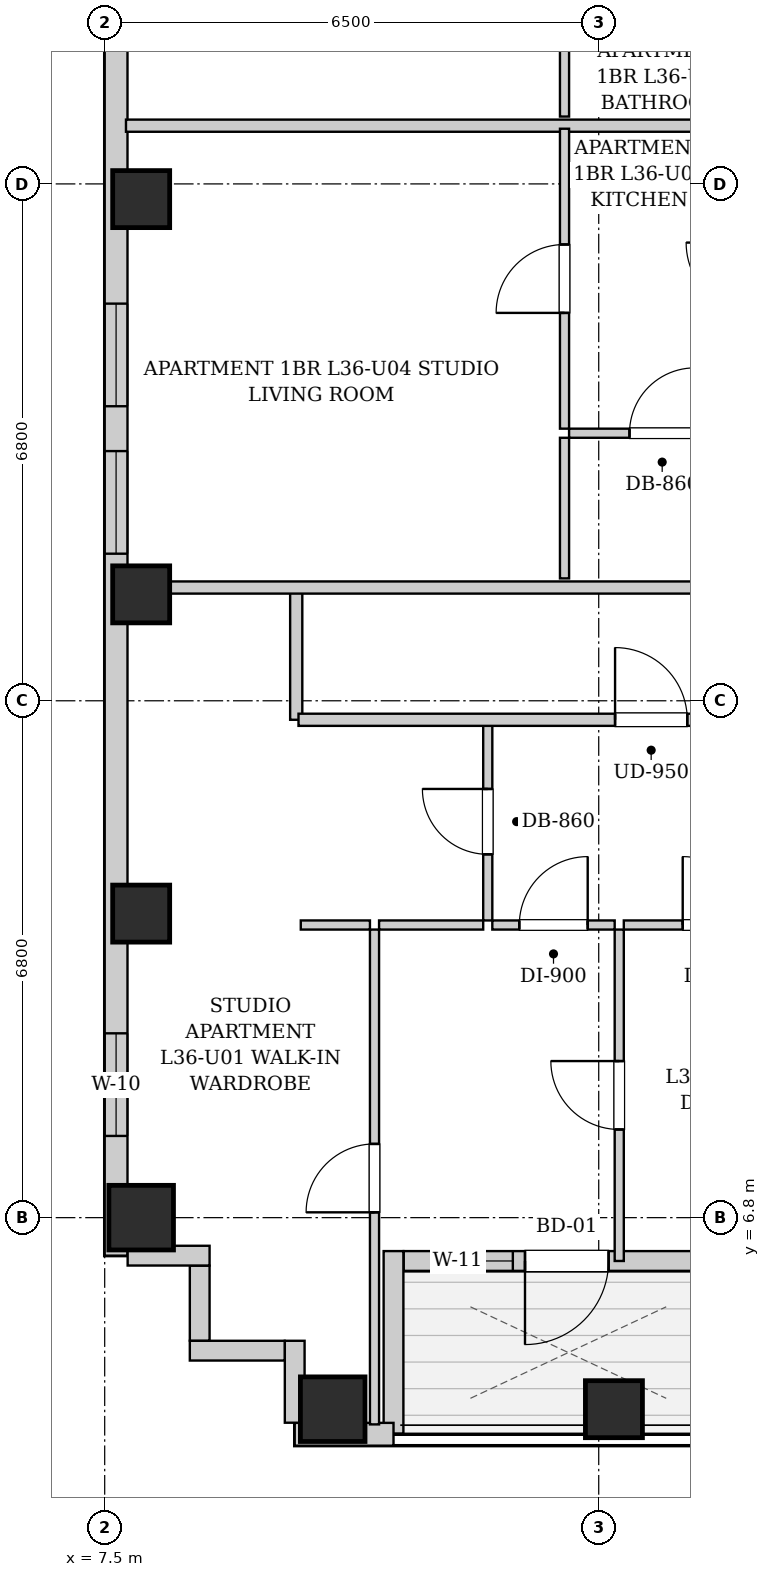
"""IFC4 building model, lengths in metres.
Left out: names, types, materials, properties, quantities, classifications, styles, units other than length and angle.
Written with IfcOpenShell. Run it as: python <this file> out.ifc"""

import sys

from ifc_helpers import new_model, si_unit, direction, frame, frame_2d, origin, origin_2d, place, context, subcontext, project, spatial, rectangle, extrude, element, fill, save


model = new_model("IFC4")
c1 = context("Model", 3, precision=1e-05, world=origin(), true_north=direction((0.0, 1.0)))
c2 = subcontext(c1, "Body", "Model", "MODEL_VIEW")
j1 = project(units=[si_unit("LENGTHUNIT", "METRE"), si_unit("PLANEANGLEUNIT", "RADIAN")], contexts=[c1])
p1 = place(None, origin())
s1 = spatial("IfcSite", under=j1, at=p1, CompositionType="ELEMENT")
p2 = place(p1, origin())
s2 = spatial("IfcBuilding", under=s1, at=p2, CompositionType="ELEMENT")
p3 = place(p2, frame((0.0, 0.0, 127.65)))
s3 = spatial("IfcBuildingStorey", under=s2, at=p3, CompositionType="ELEMENT", Elevation=127.65)
p4 = place(p3, frame((10.5, 4.28, 0.0), z_axis=(0.0, 0.0, 1.0), x_axis=(1.0, 0.0, 0.0)))
e1 = element("IfcColumn", 1, at=p4, inside=s3, PredefinedType="COLUMN", context=c2, shape_type="SweptSolid", body=[
    extrude(rectangle(XDim=0.85, YDim=0.85, at=origin_2d()), origin(), (0.0, 0.0, 1.0), 3.25),
])
p5 = place(p3, frame((14.2, 4.28, 0.0), z_axis=(0.0, 0.0, 1.0), x_axis=(1.0, 0.0, 0.0)))
e2 = element("IfcColumn", 2, at=p5, inside=s3, PredefinedType="COLUMN", context=c2, shape_type="SweptSolid", body=[
    extrude(rectangle(XDim=0.75, YDim=0.75, at=origin_2d()), origin(), (0.0, 0.0, 1.0), 3.25),
])
p6 = place(p3, frame((7.98, 6.8, 0.0), z_axis=(0.0, 0.0, 1.0), x_axis=(1.0, 0.0, 0.0)))
e3 = element("IfcColumn", 3, at=p6, inside=s3, PredefinedType="COLUMN", context=c2, shape_type="SweptSolid", body=[
    extrude(rectangle(XDim=0.85, YDim=0.85, at=origin_2d()), origin(), (0.0, 0.0, 1.0), 3.25),
])
for number, where, z_axis, x_axis in (
    (4, (7.98, 10.8, 0.0), (0.0, 0.0, 1.0), (1.0, 0.0, 0.0)),
    (5, (7.98, 15.0, 0.0), (0.0, 0.0, 1.0), (1.0, 0.0, 0.0)),
    (6, (7.98, 20.2, 0.0), (0.0, 0.0, 1.0), (1.0, 0.0, 0.0)),
):
    element("IfcColumn", number, at=place(p3, frame(where, z_axis=z_axis, x_axis=x_axis)), inside=s3, PredefinedType="COLUMN", context=c2, shape_type="SweptSolid", body=[
        extrude(rectangle(XDim=0.75, YDim=0.75, at=origin_2d()), origin(), (0.0, 0.0, 1.0), 3.25),
    ])
p7 = place(p3, frame((15.766, 6.23, 0.0), z_axis=(0.0, 0.0, 1.0), x_axis=(-1.0, 0.0, 0.0)))
e7 = element("IfcWall", 7, at=p7, inside=s3, PredefinedType="SOLIDWALL", context=c2, shape_type="SweptSolid", body=[
    extrude(rectangle(XDim=4.332, YDim=0.26, at=frame_2d((2.166, 0.0))), origin(), (0.0, 0.0, 1.0), 2.99),
])
p8 = place(p7, frame((1.636, 0.0, 0.0)))
e8 = element("IfcOpeningElement", 8, at=p8, cuts=e7, PredefinedType="OPENING", context=c2, shape_type="SweptSolid", body=[
    extrude(rectangle(XDim=1.1, YDim=2.0, at=frame_2d((0.55, 1.0))), frame((0.0, 0.14, 0.0), z_axis=(0.0, -1.0, 0.0), x_axis=(1.0, 0.0, 0.0)), (0.0, 0.0, 1.0), 0.28),
])
p9 = place(p7, frame((2.896, 0.0, 0.55)))
e9 = element("IfcOpeningElement", 9, at=p9, cuts=e7, PredefinedType="OPENING", context=c2, shape_type="SweptSolid", body=[
    extrude(rectangle(XDim=0.85, YDim=1.2, at=frame_2d((0.425, 0.6))), frame((0.0, 0.14, 0.0), z_axis=(0.0, -1.0, 0.0), x_axis=(1.0, 0.0, 0.0)), (0.0, 0.0, 1.0), 0.28),
])
p10 = place(p3, frame((11.3, 6.36, 0.0), z_axis=(0.0, 0.0, 1.0), x_axis=(0.0, -1.0, 0.0)))
e10 = element("IfcWall", 10, at=p10, inside=s3, PredefinedType="SOLIDWALL", context=c2, shape_type="SweptSolid", body=[
    extrude(rectangle(XDim=2.4, YDim=0.26, at=frame_2d((1.2, 0.0))), origin(), (0.0, 0.0, 1.0), 2.99),
])
p11 = place(p3, frame((11.3, 3.95, 0.0), z_axis=(0.0, 0.0, 1.0), x_axis=(-1.0, 0.0, 0.0)))
e11 = element("IfcWall", 11, at=p11, inside=s3, PredefinedType="SOLIDWALL", context=c2, shape_type="SweptSolid", body=[
    extrude(rectangle(XDim=1.3, YDim=0.3, at=frame_2d((0.65, 0.0))), origin(), (0.0, 0.0, 1.0), 2.99),
])
p12 = place(p3, frame((7.65, 6.3, 0.0), z_axis=(0.0, 0.0, 1.0), x_axis=(0.0, 1.0, 0.0)))
e12 = element("IfcWall", 12, at=p12, inside=s3, PredefinedType="SOLIDWALL", context=c2, shape_type="SweptSolid", body=[
    extrude(rectangle(XDim=34.5, YDim=0.3, at=frame_2d((17.25, 0.0))), origin(), (0.0, 0.0, 1.0), 2.99),
])
p13 = place(p12, frame((1.575, 0.0, 0.55)))
e13 = element("IfcOpeningElement", 13, at=p13, cuts=e12, PredefinedType="OPENING", context=c2, shape_type="SweptSolid", body=[
    extrude(rectangle(XDim=1.35, YDim=1.2, at=frame_2d((0.675, 0.6))), frame((0.0, 0.16, 0.0), z_axis=(0.0, -1.0, 0.0), x_axis=(1.0, 0.0, 0.0)), (0.0, 0.0, 1.0), 0.32),
])
p14 = place(p12, frame((30.075, 0.0, 0.55)))
e14 = element("IfcOpeningElement", 14, at=p14, cuts=e12, PredefinedType="OPENING", context=c2, shape_type="SweptSolid", body=[
    extrude(rectangle(XDim=1.35, YDim=1.2, at=frame_2d((0.675, 0.6))), frame((0.0, 0.16, 0.0), z_axis=(0.0, -1.0, 0.0), x_axis=(1.0, 0.0, 0.0)), (0.0, 0.0, 1.0), 0.32),
])
p15 = place(p12, frame((28.235, 0.0, 0.55)))
e15 = element("IfcOpeningElement", 15, at=p15, cuts=e12, PredefinedType="OPENING", context=c2, shape_type="SweptSolid", body=[
    extrude(rectangle(XDim=1.35, YDim=1.2, at=frame_2d((0.675, 0.6))), frame((0.0, 0.16, 0.0), z_axis=(0.0, -1.0, 0.0), x_axis=(1.0, 0.0, 0.0)), (0.0, 0.0, 1.0), 0.32),
])
p16 = place(p12, frame((11.175, 0.0, 0.55)))
e16 = element("IfcOpeningElement", 16, at=p16, cuts=e12, PredefinedType="OPENING", context=c2, shape_type="SweptSolid", body=[
    extrude(rectangle(XDim=1.35, YDim=1.2, at=frame_2d((0.675, 0.6))), frame((0.0, 0.16, 0.0), z_axis=(0.0, -1.0, 0.0), x_axis=(1.0, 0.0, 0.0)), (0.0, 0.0, 1.0), 0.32),
])
p17 = place(p12, frame((9.235, 0.0, 0.55)))
e17 = element("IfcOpeningElement", 17, at=p17, cuts=e12, PredefinedType="OPENING", context=c2, shape_type="SweptSolid", body=[
    extrude(rectangle(XDim=1.35, YDim=1.2, at=frame_2d((0.675, 0.6))), frame((0.0, 0.16, 0.0), z_axis=(0.0, -1.0, 0.0), x_axis=(1.0, 0.0, 0.0)), (0.0, 0.0, 1.0), 0.32),
])
p18 = place(p12, frame((18.2, 0.0, 0.55)))
e18 = element("IfcOpeningElement", 18, at=p18, cuts=e12, PredefinedType="OPENING", context=c2, shape_type="SweptSolid", body=[
    extrude(rectangle(XDim=1.35, YDim=1.2, at=frame_2d((0.675, 0.6))), frame((0.0, 0.16, 0.0), z_axis=(0.0, -1.0, 0.0), x_axis=(1.0, 0.0, 0.0)), (0.0, 0.0, 1.0), 0.32),
])
p19 = place(p12, frame((19.81, 0.0, 0.55)))
e19 = element("IfcOpeningElement", 19, at=p19, cuts=e12, PredefinedType="OPENING", context=c2, shape_type="SweptSolid", body=[
    extrude(rectangle(XDim=1.35, YDim=1.2, at=frame_2d((0.675, 0.6))), frame((0.0, 0.16, 0.0), z_axis=(0.0, -1.0, 0.0), x_axis=(1.0, 0.0, 0.0)), (0.0, 0.0, 1.0), 0.32),
])
p20 = place(p3, frame((10.0, 4.102, 0.0), z_axis=(0.0, 0.0, 1.0), x_axis=(0.0, 1.0, 0.0)))
e20 = element("IfcWall", 20, at=p20, inside=s3, PredefinedType="SOLIDWALL", context=c2, shape_type="SweptSolid", body=[
    extrude(rectangle(XDim=1.078, YDim=0.26, at=frame_2d((0.539, 0.0))), origin(), (0.0, 0.0, 1.0), 2.99),
])
p21 = place(p3, frame((9.868, 5.05, 0.0), z_axis=(0.0, 0.0, 1.0), x_axis=(-1.0, 0.0, 0.0)))
e21 = element("IfcWall", 21, at=p21, inside=s3, PredefinedType="SOLIDWALL", context=c2, shape_type="SweptSolid", body=[
    extrude(rectangle(XDim=1.248, YDim=0.26, at=frame_2d((0.624, 0.0))), origin(), (0.0, 0.0, 1.0), 2.99),
])
p22 = place(p3, frame((8.75, 5.182, 0.0), z_axis=(0.0, 0.0, 1.0), x_axis=(0.0, 1.0, 0.0)))
e22 = element("IfcWall", 22, at=p22, inside=s3, PredefinedType="SOLIDWALL", context=c2, shape_type="SweptSolid", body=[
    extrude(rectangle(XDim=0.986, YDim=0.26, at=frame_2d((0.493, 0.0))), origin(), (0.0, 0.0, 1.0), 2.99),
])
p23 = place(p3, frame((8.88, 6.3, 0.0), z_axis=(0.0, 0.0, 1.0), x_axis=(-1.0, 0.0, 0.0)))
e23 = element("IfcWall", 23, at=p23, inside=s3, PredefinedType="SOLIDWALL", context=c2, shape_type="SweptSolid", body=[
    extrude(rectangle(XDim=1.078, YDim=0.26, at=frame_2d((0.539, 0.0))), origin(), (0.0, 0.0, 1.0), 2.99),
])
p24 = place(p3, frame((10.02, 13.35, 0.0), z_axis=(0.0, 0.0, 1.0), x_axis=(0.0, 1.0, 0.0)))
e24 = element("IfcWall", 24, at=p24, inside=s3, PredefinedType="PARTITIONING", context=c2, shape_type="SweptSolid", body=[
    extrude(rectangle(XDim=1.74, YDim=0.16, at=frame_2d((0.87, 0.0))), origin(), (0.0, 0.0, 1.0), 2.99),
])
p25 = place(p3, frame((7.78, 15.09, 0.0), z_axis=(0.0, 0.0, 1.0), x_axis=(1.0, 0.0, 0.0)))
e25 = element("IfcWall", 25, at=p25, inside=s3, PredefinedType="PARTITIONING", context=c2, shape_type="SweptSolid", body=[
    extrude(rectangle(XDim=8.36, YDim=0.16, at=frame_2d((4.18, 0.0))), origin(), (0.0, 0.0, 1.0), 2.426),
])
p26 = place(p3, frame((12.54, 10.71, 0.0), z_axis=(0.0, 0.0, 1.0), x_axis=(0.0, 1.0, 0.0)))
e26 = element("IfcWall", 26, at=p26, inside=s3, PredefinedType="PARTITIONING", context=c2, shape_type="SweptSolid", body=[
    extrude(rectangle(XDim=2.6, YDim=0.12, at=frame_2d((1.3, 0.0))), origin(), (0.0, 0.0, 1.0), 2.99),
])
p27 = place(p26, frame((0.87, 0.0, 0.0)))
e27 = element("IfcOpeningElement", 27, at=p27, cuts=e26, PredefinedType="OPENING", context=c2, shape_type="SweptSolid", body=[
    extrude(rectangle(XDim=0.86, YDim=2.05, at=frame_2d((0.43, 1.025))), frame((0.0, 0.07, 0.0), z_axis=(0.0, -1.0, 0.0), x_axis=(1.0, 0.0, 0.0)), (0.0, 0.0, 1.0), 0.14),
])
p28 = place(p3, frame((10.08, 10.65, 0.0), z_axis=(0.0, 0.0, 1.0), x_axis=(1.0, 0.0, 0.0)))
e28 = element("IfcWall", 28, at=p28, inside=s3, PredefinedType="PARTITIONING", context=c2, shape_type="SweptSolid", body=[
    extrude(rectangle(XDim=0.91, YDim=0.12, at=frame_2d((0.455, 0.0))), origin(), (0.0, 0.0, 1.0), 2.99),
])
p29 = place(p3, frame((11.11, 10.65, 0.0), z_axis=(0.0, 0.0, 1.0), x_axis=(1.0, 0.0, 0.0)))
e29 = element("IfcWall", 29, at=p29, inside=s3, PredefinedType="PARTITIONING", context=c2, shape_type="SweptSolid", body=[
    extrude(rectangle(XDim=1.37, YDim=0.12, at=frame_2d((0.685, 0.0))), origin(), (0.0, 0.0, 1.0), 2.99),
])
p30 = place(p3, frame((12.6, 10.65, 0.0), z_axis=(0.0, 0.0, 1.0), x_axis=(1.0, 0.0, 0.0)))
e30 = element("IfcWall", 30, at=p30, inside=s3, PredefinedType="PARTITIONING", context=c2, shape_type="SweptSolid", body=[
    extrude(rectangle(XDim=1.61, YDim=0.12, at=frame_2d((0.805, 0.0))), origin(), (0.0, 0.0, 1.0), 2.99),
])
p31 = place(p30, frame((0.355, 0.0, 0.0)))
e31 = element("IfcOpeningElement", 31, at=p31, cuts=e30, PredefinedType="OPENING", context=c2, shape_type="SweptSolid", body=[
    extrude(rectangle(XDim=0.9, YDim=2.05, at=frame_2d((0.45, 1.025))), frame((0.0, 0.07, 0.0), z_axis=(0.0, -1.0, 0.0), x_axis=(1.0, 0.0, 0.0)), (0.0, 0.0, 1.0), 0.14),
])
p32 = place(p3, frame((14.33, 10.65, 0.0), z_axis=(0.0, 0.0, 1.0), x_axis=(1.0, 0.0, 0.0)))
e32 = element("IfcWall", 32, at=p32, inside=s3, PredefinedType="PARTITIONING", context=c2, shape_type="SweptSolid", body=[
    extrude(rectangle(XDim=2.45, YDim=0.12, at=frame_2d((1.225, 0.0))), origin(), (0.0, 0.0, 1.0), 2.99),
])
p33 = place(p32, frame((0.775, 0.0, 0.0)))
e33 = element("IfcOpeningElement", 33, at=p33, cuts=e32, PredefinedType="OPENING", context=c2, shape_type="SweptSolid", body=[
    extrude(rectangle(XDim=0.9, YDim=2.05, at=frame_2d((0.45, 1.025))), frame((0.0, 0.07, 0.0), z_axis=(0.0, -1.0, 0.0), x_axis=(1.0, 0.0, 0.0)), (0.0, 0.0, 1.0), 0.14),
])
p34 = place(p3, frame((11.05, 4.08, 0.0), z_axis=(0.0, 0.0, 1.0), x_axis=(0.0, 1.0, 0.0)))
e34 = element("IfcWall", 34, at=p34, inside=s3, PredefinedType="PARTITIONING", context=c2, shape_type="SweptSolid", body=[
    extrude(rectangle(XDim=6.51, YDim=0.12, at=frame_2d((3.255, 0.0))), origin(), (0.0, 0.0, 1.0), 2.99),
])
p35 = place(p34, frame((2.79, 0.0, 0.0)))
e35 = element("IfcOpeningElement", 35, at=p35, cuts=e34, PredefinedType="OPENING", context=c2, shape_type="SweptSolid", body=[
    extrude(rectangle(XDim=0.9, YDim=2.05, at=frame_2d((0.45, 1.025))), frame((0.0, 0.07, 0.0), z_axis=(0.0, -1.0, 0.0), x_axis=(1.0, 0.0, 0.0)), (0.0, 0.0, 1.0), 0.14),
])
p36 = place(p3, frame((14.27, 6.23, 0.0), z_axis=(0.0, 0.0, 1.0), x_axis=(0.0, 1.0, 0.0)))
e36 = element("IfcWall", 36, at=p36, inside=s3, PredefinedType="PARTITIONING", context=c2, shape_type="SweptSolid", body=[
    extrude(rectangle(XDim=4.36, YDim=0.12, at=frame_2d((2.18, 0.0))), origin(), (0.0, 0.0, 1.0), 2.99),
])
p37 = place(p36, frame((1.73, 0.0, 0.0)))
e37 = element("IfcOpeningElement", 37, at=p37, cuts=e36, PredefinedType="OPENING", context=c2, shape_type="SweptSolid", body=[
    extrude(rectangle(XDim=0.9, YDim=2.05, at=frame_2d((0.45, 1.025))), frame((0.0, 0.07, 0.0), z_axis=(0.0, -1.0, 0.0), x_axis=(1.0, 0.0, 0.0)), (0.0, 0.0, 1.0), 0.14),
])
p38 = place(p3, frame((7.78, 21.166, 0.0), z_axis=(0.0, 0.0, 1.0), x_axis=(1.0, 0.0, 0.0)))
e38 = element("IfcWall", 38, at=p38, inside=s3, PredefinedType="PARTITIONING", context=c2, shape_type="SweptSolid", body=[
    extrude(rectangle(XDim=8.28, YDim=0.16, at=frame_2d((4.14, 0.0))), origin(), (0.0, 0.0, 1.0), 2.99),
])
p39 = place(p3, frame((13.61, 17.12, 0.0), z_axis=(0.0, 0.0, 1.0), x_axis=(1.0, 0.0, 0.0)))
e39 = element("IfcWall", 39, at=p39, inside=s3, PredefinedType="PARTITIONING", context=c2, shape_type="SweptSolid", body=[
    extrude(rectangle(XDim=2.45, YDim=0.12, at=frame_2d((1.225, 0.0))), origin(), (0.0, 0.0, 1.0), 2.99),
])
p40 = place(p39, frame((0.795, 0.0, 0.0)))
e40 = element("IfcOpeningElement", 40, at=p40, cuts=e39, PredefinedType="OPENING", context=c2, shape_type="SweptSolid", body=[
    extrude(rectangle(XDim=0.86, YDim=2.05, at=frame_2d((0.43, 1.025))), frame((0.0, 0.07, 0.0), z_axis=(0.0, -1.0, 0.0), x_axis=(1.0, 0.0, 0.0)), (0.0, 0.0, 1.0), 0.14),
])
p41 = place(p3, frame((13.55, 15.21, 0.0), z_axis=(0.0, 0.0, 1.0), x_axis=(0.0, 1.0, 0.0)))
e41 = element("IfcWall", 41, at=p41, inside=s3, PredefinedType="PARTITIONING", context=c2, shape_type="SweptSolid", body=[
    extrude(rectangle(XDim=1.85, YDim=0.12, at=frame_2d((0.925, 0.0))), origin(), (0.0, 0.0, 1.0), 2.99),
])
p42 = place(p3, frame((13.55, 17.18, 0.0), z_axis=(0.0, 0.0, 1.0), x_axis=(0.0, 1.0, 0.0)))
e42 = element("IfcWall", 42, at=p42, inside=s3, PredefinedType="PARTITIONING", context=c2, shape_type="SweptSolid", body=[
    extrude(rectangle(XDim=3.946, YDim=0.12, at=frame_2d((1.973, 0.0))), origin(), (0.0, 0.0, 1.0), 2.99),
])
p43 = place(p42, frame((1.523, 0.0, 0.0)))
e43 = element("IfcOpeningElement", 43, at=p43, cuts=e42, PredefinedType="OPENING", context=c2, shape_type="SweptSolid", body=[
    extrude(rectangle(XDim=0.9, YDim=2.05, at=frame_2d((0.45, 1.025))), frame((0.0, 0.07, 0.0), z_axis=(0.0, -1.0, 0.0), x_axis=(1.0, 0.0, 0.0)), (0.0, 0.0, 1.0), 0.14),
])
p44 = place(p3, frame((13.55, 21.286, 0.0), z_axis=(0.0, 0.0, 1.0), x_axis=(0.0, 1.0, 0.0)))
e44 = element("IfcWall", 44, at=p44, inside=s3, PredefinedType="PARTITIONING", context=c2, shape_type="SweptSolid", body=[
    extrude(rectangle(XDim=2.121, YDim=0.12, at=frame_2d((1.061, 0.0))), origin(), (0.0, 0.0, 1.0), 2.99),
])
p45 = place(p3, frame((10.05, 13.35, 0.0), z_axis=(0.0, 0.0, 1.0), x_axis=(1.0, 0.0, 0.0)))
e45 = element("IfcWall", 45, at=p45, inside=s3, PredefinedType="PARTITIONING", context=c2, shape_type="SweptSolid", body=[
    extrude(rectangle(XDim=27.7, YDim=0.16, at=frame_2d((13.85, 0.0))), origin(), (0.0, 0.0, 1.0), 2.99),
])
p46 = place(p45, frame((4.165, 0.0, 0.0)))
e46 = element("IfcOpeningElement", 46, at=p46, cuts=e45, PredefinedType="OPENING", context=c2, shape_type="SweptSolid", body=[
    extrude(rectangle(XDim=0.95, YDim=2.1, at=frame_2d((0.475, 1.05))), frame((0.0, 0.09, 0.0), z_axis=(0.0, -1.0, 0.0), x_axis=(1.0, 0.0, 0.0)), (0.0, 0.0, 1.0), 0.18),
])
p47 = place(p27, origin())
e47 = element("IfcDoor", 47, at=p47, inside=s3, OperationType="SINGLE_SWING_RIGHT", PredefinedType="DOOR", context=c2, shape_type="SweptSolid", body=[
    extrude(rectangle(XDim=0.86, YDim=2.05, at=frame_2d((0.43, 1.025))), frame((0.0, 0.025, 0.0), z_axis=(0.0, -1.0, 0.0), x_axis=(1.0, 0.0, 0.0)), (0.0, 0.0, 1.0), 0.05),
])
fill(e27, e47)
p48 = place(p31, origin())
e48 = element("IfcDoor", 48, at=p48, inside=s3, OperationType="SINGLE_SWING_RIGHT", PredefinedType="DOOR", context=c2, shape_type="SweptSolid", body=[
    extrude(rectangle(XDim=0.9, YDim=2.05, at=frame_2d((0.45, 1.025))), frame((0.0, 0.025, 0.0), z_axis=(0.0, -1.0, 0.0), x_axis=(1.0, 0.0, 0.0)), (0.0, 0.0, 1.0), 0.05),
])
fill(e31, e48)
p49 = place(p33, origin())
e49 = element("IfcDoor", 49, at=p49, inside=s3, OperationType="SINGLE_SWING_LEFT", PredefinedType="DOOR", context=c2, shape_type="SweptSolid", body=[
    extrude(rectangle(XDim=0.9, YDim=2.05, at=frame_2d((0.45, 1.025))), frame((0.0, 0.025, 0.0), z_axis=(0.0, -1.0, 0.0), x_axis=(1.0, 0.0, 0.0)), (0.0, 0.0, 1.0), 0.05),
])
fill(e33, e49)
p50 = place(p35, origin())
e50 = element("IfcDoor", 50, at=p50, inside=s3, OperationType="SINGLE_SWING_LEFT", PredefinedType="DOOR", context=c2, shape_type="SweptSolid", body=[
    extrude(rectangle(XDim=0.9, YDim=2.05, at=frame_2d((0.45, 1.025))), frame((0.0, 0.025, 0.0), z_axis=(0.0, -1.0, 0.0), x_axis=(1.0, 0.0, 0.0)), (0.0, 0.0, 1.0), 0.05),
])
fill(e35, e50)
p51 = place(p37, origin())
e51 = element("IfcDoor", 51, at=p51, inside=s3, OperationType="SINGLE_SWING_RIGHT", PredefinedType="DOOR", context=c2, shape_type="SweptSolid", body=[
    extrude(rectangle(XDim=0.9, YDim=2.05, at=frame_2d((0.45, 1.025))), frame((0.0, 0.025, 0.0), z_axis=(0.0, -1.0, 0.0), x_axis=(1.0, 0.0, 0.0)), (0.0, 0.0, 1.0), 0.05),
])
fill(e37, e51)
p52 = place(p40, origin())
e52 = element("IfcDoor", 52, at=p52, inside=s3, OperationType="SINGLE_SWING_RIGHT", PredefinedType="DOOR", context=c2, shape_type="SweptSolid", body=[
    extrude(rectangle(XDim=0.86, YDim=2.05, at=frame_2d((0.43, 1.025))), frame((0.0, 0.025, 0.0), z_axis=(0.0, -1.0, 0.0), x_axis=(1.0, 0.0, 0.0)), (0.0, 0.0, 1.0), 0.05),
])
fill(e40, e52)
p53 = place(p43, origin())
e53 = element("IfcDoor", 53, at=p53, inside=s3, OperationType="SINGLE_SWING_LEFT", PredefinedType="DOOR", context=c2, shape_type="SweptSolid", body=[
    extrude(rectangle(XDim=0.9, YDim=2.05, at=frame_2d((0.45, 1.025))), frame((0.0, 0.025, 0.0), z_axis=(0.0, -1.0, 0.0), x_axis=(1.0, 0.0, 0.0)), (0.0, 0.0, 1.0), 0.05),
])
fill(e43, e53)
p54 = place(p46, origin())
e54 = element("IfcDoor", 54, at=p54, inside=s3, OperationType="SINGLE_SWING_LEFT", PredefinedType="DOOR", context=c2, shape_type="SweptSolid", body=[
    extrude(rectangle(XDim=0.95, YDim=2.1, at=frame_2d((0.475, 1.05))), frame((0.0, 0.025, 0.0), z_axis=(0.0, -1.0, 0.0), x_axis=(1.0, 0.0, 0.0)), (0.0, 0.0, 1.0), 0.05),
])
fill(e46, e54)
p55 = place(p8, origin())
e55 = element("IfcDoor", 55, at=p55, inside=s3, OperationType="SINGLE_SWING_RIGHT", PredefinedType="DOOR", context=c2, shape_type="SweptSolid", body=[
    extrude(rectangle(XDim=1.1, YDim=2.0, at=frame_2d((0.55, 1.0))), frame((0.0, 0.025, 0.0), z_axis=(0.0, -1.0, 0.0), x_axis=(1.0, 0.0, 0.0)), (0.0, 0.0, 1.0), 0.05),
])
fill(e8, e55)
p56 = place(p13, origin())
e56 = element("IfcWindow", 56, at=p56, inside=s3, PartitioningType="SINGLE_PANEL", PredefinedType="WINDOW", context=c2, shape_type="SweptSolid", body=[
    extrude(rectangle(XDim=1.35, YDim=1.2, at=frame_2d((0.675, 0.6))), frame((0.0, 0.03, 0.0), z_axis=(0.0, -1.0, 0.0), x_axis=(1.0, 0.0, 0.0)), (0.0, 0.0, 1.0), 0.06),
])
fill(e13, e56)
p57 = place(p9, origin())
e57 = element("IfcWindow", 57, at=p57, inside=s3, PartitioningType="SINGLE_PANEL", PredefinedType="WINDOW", context=c2, shape_type="SweptSolid", body=[
    extrude(rectangle(XDim=0.85, YDim=1.2, at=frame_2d((0.425, 0.6))), frame((0.0, 0.03, 0.0), z_axis=(0.0, -1.0, 0.0), x_axis=(1.0, 0.0, 0.0)), (0.0, 0.0, 1.0), 0.06),
])
fill(e9, e57)
p58 = place(p16, origin())
e58 = element("IfcWindow", 58, at=p58, inside=s3, PartitioningType="SINGLE_PANEL", PredefinedType="WINDOW", context=c2, shape_type="SweptSolid", body=[
    extrude(rectangle(XDim=1.35, YDim=1.2, at=frame_2d((0.675, 0.6))), frame((0.0, 0.03, 0.0), z_axis=(0.0, -1.0, 0.0), x_axis=(1.0, 0.0, 0.0)), (0.0, 0.0, 1.0), 0.06),
])
fill(e16, e58)
p59 = place(p17, origin())
e59 = element("IfcWindow", 59, at=p59, inside=s3, PartitioningType="SINGLE_PANEL", PredefinedType="WINDOW", context=c2, shape_type="SweptSolid", body=[
    extrude(rectangle(XDim=1.35, YDim=1.2, at=frame_2d((0.675, 0.6))), frame((0.0, 0.03, 0.0), z_axis=(0.0, -1.0, 0.0), x_axis=(1.0, 0.0, 0.0)), (0.0, 0.0, 1.0), 0.06),
])
fill(e17, e59)
save(model, sys.argv[1])
